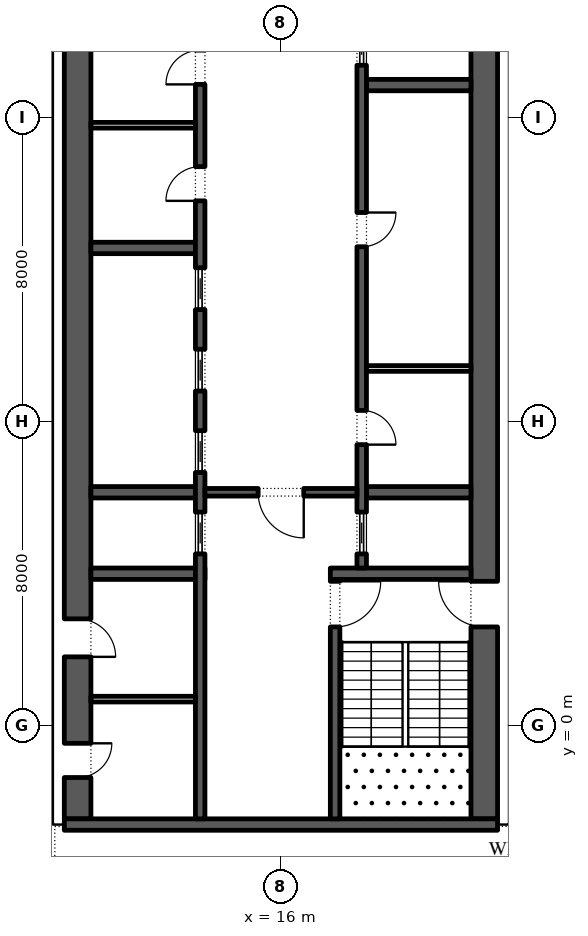
"""IFC4 building model, lengths in metres.
Left out: names, types, materials, properties, quantities, classifications, styles, units other than length and angle.
Written with IfcOpenShell. Run it as: python <this file> out.ifc"""

import sys

from ifc_helpers import new_model, si_unit, direction, frame, frame_2d, origin, place, context, subcontext, project, spatial, rectangle, extrude, element, fill, save


model = new_model("IFC4")
c1 = context("Model", 3, precision=1e-05, world=origin(), true_north=direction((0.0, 1.0)))
c2 = subcontext(c1, "Body", "Model", "MODEL_VIEW")
j1 = project(units=[si_unit("LENGTHUNIT", "METRE"), si_unit("PLANEANGLEUNIT", "RADIAN")], contexts=[c1])
p1 = place(None, origin())
s1 = spatial("IfcSite", under=j1, at=p1, CompositionType="ELEMENT")
p2 = place(p1, origin())
s2 = spatial("IfcBuilding", under=s1, at=p2, CompositionType="ELEMENT")
p3 = place(p2, frame((0.0, 0.0, 180.0)))
s3 = spatial("IfcBuildingStorey", under=s2, at=p3, CompositionType="ELEMENT", Elevation=180.0)
p4 = place(p3, frame((33.157, -5.092, 0.0), z_axis=(0.0, 0.0, 1.0), x_axis=(-0.224950279389, 0.974370243697, 0.0)))
e1 = element("IfcWall", 1, at=p4, inside=s3, PredefinedType="STANDARD", context=c2, shape_type="SweptSolid", body=[
    extrude(rectangle(XDim=49.5, YDim=0.3, at=frame_2d((24.75, 0.0))), origin(), (0.0, 0.0, 1.0), 4.0),
])
p5 = place(p4, frame((2.207, 0.0, 0.0)))
e2 = element("IfcOpeningElement", 2, at=p5, cuts=e1, PredefinedType="OPENING", context=c2, shape_type="SweptSolid", body=[
    extrude(rectangle(XDim=2.4, YDim=3.125, at=frame_2d((1.2, 1.562))), frame((0.0, 0.16, 0.0), z_axis=(0.0, -1.0, 0.0), x_axis=(1.0, 0.0, 0.0)), (0.0, 0.0, 1.0), 0.32),
])
p6 = place(p4, frame((8.121, 0.0, 0.45)))
e3 = element("IfcOpeningElement", 3, at=p6, cuts=e1, PredefinedType="OPENING", context=c2, shape_type="SweptSolid", body=[
    extrude(rectangle(XDim=4.5, YDim=2.875, at=frame_2d((2.25, 1.438))), frame((0.0, 0.16, 0.0), z_axis=(0.0, -1.0, 0.0), x_axis=(1.0, 0.0, 0.0)), (0.0, 0.0, 1.0), 0.32),
])
p7 = place(p4, frame((15.236, 0.0, 0.45)))
e4 = element("IfcOpeningElement", 4, at=p7, cuts=e1, PredefinedType="OPENING", context=c2, shape_type="SweptSolid", body=[
    extrude(rectangle(XDim=4.5, YDim=2.875, at=frame_2d((2.25, 1.438))), frame((0.0, 0.16, 0.0), z_axis=(0.0, -1.0, 0.0), x_axis=(1.0, 0.0, 0.0)), (0.0, 0.0, 1.0), 0.32),
])
p8 = place(p4, frame((22.35, 0.0, 0.45)))
e5 = element("IfcOpeningElement", 5, at=p8, cuts=e1, PredefinedType="OPENING", context=c2, shape_type="SweptSolid", body=[
    extrude(rectangle(XDim=4.5, YDim=3.0, at=frame_2d((2.25, 1.5))), frame((0.0, 0.16, 0.0), z_axis=(0.0, -1.0, 0.0), x_axis=(1.0, 0.0, 0.0)), (0.0, 0.0, 1.0), 0.32),
])
p9 = place(p4, frame((30.514, 0.0, 0.0)))
e6 = element("IfcOpeningElement", 6, at=p9, cuts=e1, PredefinedType="OPENING", context=c2, shape_type="SweptSolid", body=[
    extrude(rectangle(XDim=2.4, YDim=3.45, at=frame_2d((1.2, 1.725))), frame((0.0, 0.16, 0.0), z_axis=(0.0, -1.0, 0.0), x_axis=(1.0, 0.0, 0.0)), (0.0, 0.0, 1.0), 0.32),
])
p10 = place(p4, frame((36.579, 0.0, 0.45)))
e7 = element("IfcOpeningElement", 7, at=p10, cuts=e1, PredefinedType="OPENING", context=c2, shape_type="SweptSolid", body=[
    extrude(rectangle(XDim=4.5, YDim=3.05, at=frame_2d((2.25, 1.525))), frame((0.0, 0.16, 0.0), z_axis=(0.0, -1.0, 0.0), x_axis=(1.0, 0.0, 0.0)), (0.0, 0.0, 1.0), 0.32),
])
p11 = place(p4, frame((43.693, 0.0, 0.45)))
e8 = element("IfcOpeningElement", 8, at=p11, cuts=e1, PredefinedType="OPENING", context=c2, shape_type="SweptSolid", body=[
    extrude(rectangle(XDim=4.5, YDim=3.05, at=frame_2d((2.25, 1.525))), frame((0.0, 0.16, 0.0), z_axis=(0.0, -1.0, 0.0), x_axis=(1.0, 0.0, 0.0)), (0.0, 0.0, 1.0), 0.32),
])
p12 = place(p3, frame((21.35, -2.45, 0.0), z_axis=(0.0, 0.0, 1.0), x_axis=(0.0, 1.0, 0.0)))
e9 = element("IfcWall", 9, at=p12, inside=s3, PredefinedType="SHEAR", context=c2, shape_type="SweptSolid", body=[
    extrude(rectangle(XDim=27.9, YDim=0.7, at=frame_2d((13.95, 0.0))), origin(), (0.0, 0.0, 1.0), 4.0),
])
p13 = place(p12, frame((5.05, 0.0, 0.0)))
e10 = element("IfcOpeningElement", 10, at=p13, cuts=e9, PredefinedType="OPENING", context=c2, shape_type="SweptSolid", body=[
    extrude(rectangle(XDim=1.2, YDim=2.1, at=frame_2d((0.6, 1.05))), frame((0.0, 0.36, 0.0), z_axis=(0.0, -1.0, 0.0), x_axis=(1.0, 0.0, 0.0)), (0.0, 0.0, 1.0), 0.72),
])
p14 = place(p12, frame((21.65, 0.0, 0.0)))
e11 = element("IfcOpeningElement", 11, at=p14, cuts=e9, PredefinedType="OPENING", context=c2, shape_type="SweptSolid", body=[
    extrude(rectangle(XDim=1.2, YDim=2.1, at=frame_2d((0.6, 1.05))), frame((0.0, 0.36, 0.0), z_axis=(0.0, -1.0, 0.0), x_axis=(1.0, 0.0, 0.0)), (0.0, 0.0, 1.0), 0.72),
])
p15 = place(p3, frame((10.65, -2.45, 0.0), z_axis=(0.0, 0.0, 1.0), x_axis=(0.0, 1.0, 0.0)))
e12 = element("IfcWall", 12, at=p15, inside=s3, PredefinedType="SHEAR", context=c2, shape_type="SweptSolid", body=[
    extrude(rectangle(XDim=27.9, YDim=0.7, at=frame_2d((13.95, 0.0))), origin(), (0.0, 0.0, 1.0), 4.0),
])
p16 = place(p15, frame((23.65, 0.0, 0.0)))
e13 = element("IfcOpeningElement", 13, at=p16, cuts=e12, PredefinedType="OPENING", context=c2, shape_type="SweptSolid", body=[
    extrude(rectangle(XDim=2.4, YDim=2.1, at=frame_2d((1.2, 1.05))), frame((0.0, 0.36, 0.0), z_axis=(0.0, -1.0, 0.0), x_axis=(1.0, 0.0, 0.0)), (0.0, 0.0, 1.0), 0.72),
])
p17 = place(p15, frame((1.087, 0.0, 0.0)))
e14 = element("IfcOpeningElement", 14, at=p17, cuts=e12, PredefinedType="OPENING", context=c2, shape_type="SweptSolid", body=[
    extrude(rectangle(XDim=0.9, YDim=2.1, at=frame_2d((0.45, 1.05))), frame((0.0, 0.36, 0.0), z_axis=(0.0, -1.0, 0.0), x_axis=(1.0, 0.0, 0.0)), (0.0, 0.0, 1.0), 0.72),
])
p18 = place(p15, frame((4.262, 0.0, 0.0)))
e15 = element("IfcOpeningElement", 15, at=p18, cuts=e12, PredefinedType="OPENING", context=c2, shape_type="SweptSolid", body=[
    extrude(rectangle(XDim=1.0, YDim=2.1, at=frame_2d((0.5, 1.05))), frame((0.0, 0.36, 0.0), z_axis=(0.0, -1.0, 0.0), x_axis=(1.0, 0.0, 0.0)), (0.0, 0.0, 1.0), 0.72),
])
p19 = place(p3, frame((10.3, -2.6, 0.0), z_axis=(0.0, 0.0, 1.0), x_axis=(1.0, 0.0, 0.0)))
e16 = element("IfcWall", 16, at=p19, inside=s3, PredefinedType="SHEAR", context=c2, shape_type="SweptSolid", body=[
    extrude(rectangle(XDim=11.4, YDim=0.3, at=frame_2d((5.7, 0.0))), origin(), (0.0, 0.0, 1.0), 4.0),
])
p20 = place(p3, frame((17.3, 4.0, 0.0), z_axis=(0.0, 0.0, 1.0), x_axis=(1.0, 0.0, 0.0)))
e17 = element("IfcWall", 17, at=p20, inside=s3, PredefinedType="SHEAR", context=c2, shape_type="SweptSolid", body=[
    extrude(rectangle(XDim=3.7, YDim=0.3, at=frame_2d((1.85, 0.0))), origin(), (0.0, 0.0, 1.0), 4.0),
])
p21 = place(p3, frame((17.425, -2.45, 0.0), z_axis=(0.0, 0.0, 1.0), x_axis=(0.0, 1.0, 0.0)))
e18 = element("IfcWall", 18, at=p21, inside=s3, PredefinedType="SHEAR", context=c2, shape_type="SweptSolid", body=[
    extrude(rectangle(XDim=6.3, YDim=0.25, at=frame_2d((3.15, 0.0))), origin(), (0.0, 0.0, 1.0), 4.0),
])
p22 = place(p21, frame((5.05, 0.0, 0.0)))
e19 = element("IfcOpeningElement", 19, at=p22, cuts=e18, PredefinedType="OPENING", context=c2, shape_type="SweptSolid", body=[
    extrude(rectangle(XDim=1.2, YDim=2.1, at=frame_2d((0.6, 1.05))), frame((0.0, 0.135, 0.0), z_axis=(0.0, -1.0, 0.0), x_axis=(1.0, 0.0, 0.0)), (0.0, 0.0, 1.0), 0.27),
])
for number, where, z_axis, x_axis in (
    (20, (18.25, 6.143, 0.0), (0.0, 0.0, 1.0), (1.0, 0.0, 0.0)),
    (21, (18.25, 16.857, 0.0), (0.0, 0.0, 1.0), (1.0, 0.0, 0.0)),
):
    element("IfcWall", number, at=place(p3, frame(where, z_axis=z_axis, x_axis=x_axis)), inside=s3, PredefinedType="SHEAR", context=c2, shape_type="SweptSolid", body=[
        extrude(rectangle(XDim=2.75, YDim=0.3, at=frame_2d((1.375, 0.0))), origin(), (0.0, 0.0, 1.0), 4.0),
    ])
p23 = place(p3, frame((18.125, 4.15, 0.0), z_axis=(0.0, 0.0, 1.0), x_axis=(0.0, 1.0, 0.0)))
e22 = element("IfcWall", 22, at=p23, inside=s3, PredefinedType="SHEAR", context=c2, shape_type="SweptSolid", body=[
    extrude(rectangle(XDim=14.7, YDim=0.25, at=frame_2d((7.35, 0.0))), origin(), (0.0, 0.0, 1.0), 4.0),
])
p24 = place(p23, frame((3.246, 0.0, 0.0)))
e23 = element("IfcOpeningElement", 23, at=p24, cuts=e22, PredefinedType="OPENING", context=c2, shape_type="SweptSolid", body=[
    extrude(rectangle(XDim=0.9, YDim=2.1, at=frame_2d((0.45, 1.05))), frame((0.0, 0.135, 0.0), z_axis=(0.0, -1.0, 0.0), x_axis=(1.0, 0.0, 0.0)), (0.0, 0.0, 1.0), 0.27),
])
p25 = place(p23, frame((8.454, 0.0, 0.0)))
e24 = element("IfcOpeningElement", 24, at=p25, cuts=e22, PredefinedType="OPENING", context=c2, shape_type="SweptSolid", body=[
    extrude(rectangle(XDim=0.9, YDim=2.1, at=frame_2d((0.45, 1.05))), frame((0.0, 0.135, 0.0), z_axis=(0.0, -1.0, 0.0), x_axis=(1.0, 0.0, 0.0)), (0.0, 0.0, 1.0), 0.27),
])
p26 = place(p23, frame((0.371, 0.0, 0.0)))
e25 = element("IfcOpeningElement", 25, at=p26, cuts=e22, PredefinedType="OPENING", context=c2, shape_type="SweptSolid", body=[
    extrude(rectangle(XDim=1.1, YDim=2.1, at=frame_2d((0.55, 1.05))), frame((0.0, 0.135, 0.0), z_axis=(0.0, -1.0, 0.0), x_axis=(1.0, 0.0, 0.0)), (0.0, 0.0, 1.0), 0.27),
])
p27 = place(p23, frame((13.229, 0.0, 0.0)))
e26 = element("IfcOpeningElement", 26, at=p27, cuts=e22, PredefinedType="OPENING", context=c2, shape_type="SweptSolid", body=[
    extrude(rectangle(XDim=1.1, YDim=2.1, at=frame_2d((0.55, 1.05))), frame((0.0, 0.135, 0.0), z_axis=(0.0, -1.0, 0.0), x_axis=(1.0, 0.0, 0.0)), (0.0, 0.0, 1.0), 0.27),
])
p28 = place(p3, frame((18.25, 9.4, 0.0), z_axis=(0.0, 0.0, 1.0), x_axis=(1.0, 0.0, 0.0)))
e27 = element("IfcWall", 27, at=p28, inside=s3, PredefinedType="PARTITIONING", context=c2, shape_type="SweptSolid", body=[
    extrude(rectangle(XDim=2.75, YDim=0.15, at=frame_2d((1.375, 0.0))), origin(), (0.0, 0.0, 1.0), 4.0),
])
p29 = place(p3, frame((11.0, 4.0, 0.0), z_axis=(0.0, 0.0, 1.0), x_axis=(1.0, 0.0, 0.0)))
e28 = element("IfcWall", 28, at=p29, inside=s3, PredefinedType="SHEAR", context=c2, shape_type="SweptSolid", body=[
    extrude(rectangle(XDim=3.0, YDim=0.3, at=frame_2d((1.5, 0.0))), origin(), (0.0, 0.0, 1.0), 4.0),
])
for number, where, z_axis, x_axis in (
    (29, (11.0, 6.143, 0.0), (0.0, 0.0, 1.0), (1.0, 0.0, 0.0)),
    (30, (11.0, 12.571, 0.0), (0.0, 0.0, 1.0), (1.0, 0.0, 0.0)),
):
    element("IfcWall", number, at=place(p3, frame(where, z_axis=z_axis, x_axis=x_axis)), inside=s3, PredefinedType="SHEAR", context=c2, shape_type="SweptSolid", body=[
        extrude(rectangle(XDim=2.75, YDim=0.3, at=frame_2d((1.375, 0.0))), origin(), (0.0, 0.0, 1.0), 4.0),
    ])
p30 = place(p3, frame((13.875, -2.45, 0.0), z_axis=(0.0, 0.0, 1.0), x_axis=(0.0, 1.0, 0.0)))
e31 = element("IfcWall", 31, at=p30, inside=s3, PredefinedType="SHEAR", context=c2, shape_type="SweptSolid", body=[
    extrude(rectangle(XDim=21.3, YDim=0.25, at=frame_2d((10.65, 0.0))), origin(), (0.0, 0.0, 1.0), 4.0),
])
p31 = place(p30, frame((16.261, 0.0, 0.0)))
e32 = element("IfcOpeningElement", 32, at=p31, cuts=e31, PredefinedType="OPENING", context=c2, shape_type="SweptSolid", body=[
    extrude(rectangle(XDim=0.9, YDim=2.1, at=frame_2d((0.45, 1.05))), frame((0.0, 0.135, 0.0), z_axis=(0.0, -1.0, 0.0), x_axis=(1.0, 0.0, 0.0)), (0.0, 0.0, 1.0), 0.27),
])
p32 = place(p30, frame((19.325, 0.0, 0.0)))
e33 = element("IfcOpeningElement", 33, at=p32, cuts=e31, PredefinedType="OPENING", context=c2, shape_type="SweptSolid", body=[
    extrude(rectangle(XDim=0.9, YDim=2.1, at=frame_2d((0.45, 1.05))), frame((0.0, 0.135, 0.0), z_axis=(0.0, -1.0, 0.0), x_axis=(1.0, 0.0, 0.0)), (0.0, 0.0, 1.0), 0.27),
])
p33 = place(p30, frame((6.971, 0.0, 0.0)))
e34 = element("IfcOpeningElement", 34, at=p33, cuts=e31, PredefinedType="OPENING", context=c2, shape_type="SweptSolid", body=[
    extrude(rectangle(XDim=1.1, YDim=2.1, at=frame_2d((0.55, 1.05))), frame((0.0, 0.135, 0.0), z_axis=(0.0, -1.0, 0.0), x_axis=(1.0, 0.0, 0.0)), (0.0, 0.0, 1.0), 0.27),
])
p34 = place(p30, frame((9.114, 0.0, 0.0)))
e35 = element("IfcOpeningElement", 35, at=p34, cuts=e31, PredefinedType="OPENING", context=c2, shape_type="SweptSolid", body=[
    extrude(rectangle(XDim=1.1, YDim=2.1, at=frame_2d((0.55, 1.05))), frame((0.0, 0.135, 0.0), z_axis=(0.0, -1.0, 0.0), x_axis=(1.0, 0.0, 0.0)), (0.0, 0.0, 1.0), 0.27),
])
p35 = place(p30, frame((11.257, 0.0, 0.0)))
e36 = element("IfcOpeningElement", 36, at=p35, cuts=e31, PredefinedType="OPENING", context=c2, shape_type="SweptSolid", body=[
    extrude(rectangle(XDim=1.1, YDim=2.1, at=frame_2d((0.55, 1.05))), frame((0.0, 0.135, 0.0), z_axis=(0.0, -1.0, 0.0), x_axis=(1.0, 0.0, 0.0)), (0.0, 0.0, 1.0), 0.27),
])
p36 = place(p30, frame((13.4, 0.0, 0.0)))
e37 = element("IfcOpeningElement", 37, at=p36, cuts=e31, PredefinedType="OPENING", context=c2, shape_type="SweptSolid", body=[
    extrude(rectangle(XDim=1.1, YDim=2.1, at=frame_2d((0.55, 1.05))), frame((0.0, 0.135, 0.0), z_axis=(0.0, -1.0, 0.0), x_axis=(1.0, 0.0, 0.0)), (0.0, 0.0, 1.0), 0.27),
])
p37 = place(p3, frame((11.0, 15.8, 0.0), z_axis=(0.0, 0.0, 1.0), x_axis=(1.0, 0.0, 0.0)))
e38 = element("IfcWall", 38, at=p37, inside=s3, PredefinedType="PARTITIONING", context=c2, shape_type="SweptSolid", body=[
    extrude(rectangle(XDim=2.75, YDim=0.15, at=frame_2d((1.375, 0.0))), origin(), (0.0, 0.0, 1.0), 4.0),
])
p38 = place(p3, frame((14.0, 6.143, 0.0), z_axis=(0.0, 0.0, 1.0), x_axis=(1.0, 0.0, 0.0)))
e39 = element("IfcWall", 39, at=p38, inside=s3, PredefinedType="SHEAR", context=c2, shape_type="SweptSolid", body=[
    extrude(rectangle(XDim=4.0, YDim=0.2, at=frame_2d((2.0, 0.0))), origin(), (0.0, 0.0, 1.0), 4.0),
])
p39 = place(p38, frame((1.4, 0.0, 0.0)))
e40 = element("IfcOpeningElement", 40, at=p39, cuts=e39, PredefinedType="OPENING", context=c2, shape_type="SweptSolid", body=[
    extrude(rectangle(XDim=1.2, YDim=2.1, at=frame_2d((0.6, 1.05))), frame((0.0, 0.11, 0.0), z_axis=(0.0, -1.0, 0.0), x_axis=(1.0, 0.0, 0.0)), (0.0, 0.0, 1.0), 0.22),
])
p40 = place(p3, frame((11.0, 0.7, 0.0), z_axis=(0.0, 0.0, 1.0), x_axis=(1.0, 0.0, 0.0)))
e41 = element("IfcWall", 41, at=p40, inside=s3, PredefinedType="PARTITIONING", context=c2, shape_type="SweptSolid", body=[
    extrude(rectangle(XDim=2.75, YDim=0.15, at=frame_2d((1.375, 0.0))), origin(), (0.0, 0.0, 1.0), 4.0),
])
p41 = place(p24, frame((0.9, -0.2, 0.0), z_axis=(0.0, 0.0, 1.0), x_axis=(-1.0, 0.0, 0.0)))
e42 = element("IfcDoor", 42, at=p41, inside=s3, OperationType="SINGLE_SWING_LEFT", PredefinedType="DOOR", context=c2, shape_type="SweptSolid", body=[
    extrude(rectangle(XDim=0.9, YDim=2.1, at=frame_2d((0.45, 1.05))), frame((0.0, -0.075, 0.0), z_axis=(0.0, -1.0, 0.0), x_axis=(1.0, 0.0, 0.0)), (0.0, 0.0, 1.0), 0.05),
])
fill(e23, e42)
p42 = place(p25, frame((0.9, -0.2, 0.0), z_axis=(0.0, 0.0, 1.0), x_axis=(-1.0, 0.0, 0.0)))
e43 = element("IfcDoor", 43, at=p42, inside=s3, OperationType="SINGLE_SWING_RIGHT", PredefinedType="DOOR", context=c2, shape_type="SweptSolid", body=[
    extrude(rectangle(XDim=0.9, YDim=2.1, at=frame_2d((0.45, 1.05))), frame((0.0, -0.075, 0.0), z_axis=(0.0, -1.0, 0.0), x_axis=(1.0, 0.0, 0.0)), (0.0, 0.0, 1.0), 0.05),
])
fill(e24, e43)
p43 = place(p26, origin())
e44 = element("IfcDoor", 44, at=p43, inside=s3, OperationType="SLIDING_TO_LEFT", PredefinedType="DOOR", context=c2, shape_type="SweptSolid", body=[
    extrude(rectangle(XDim=1.1, YDim=2.1, at=frame_2d((0.55, 1.05))), frame((0.0, 0.025, 0.0), z_axis=(0.0, -1.0, 0.0), x_axis=(1.0, 0.0, 0.0)), (0.0, 0.0, 1.0), 0.05),
])
fill(e25, e44)
p44 = place(p27, origin())
e45 = element("IfcDoor", 45, at=p44, inside=s3, OperationType="SLIDING_TO_LEFT", PredefinedType="DOOR", context=c2, shape_type="SweptSolid", body=[
    extrude(rectangle(XDim=1.1, YDim=2.1, at=frame_2d((0.55, 1.05))), frame((0.0, 0.025, 0.0), z_axis=(0.0, -1.0, 0.0), x_axis=(1.0, 0.0, 0.0)), (0.0, 0.0, 1.0), 0.05),
])
fill(e26, e45)
p45 = place(p31, origin())
e46 = element("IfcDoor", 46, at=p45, inside=s3, OperationType="SINGLE_SWING_RIGHT", PredefinedType="DOOR", context=c2, shape_type="SweptSolid", body=[
    extrude(rectangle(XDim=0.9, YDim=2.1, at=frame_2d((0.45, 1.05))), frame((0.0, 0.125, 0.0), z_axis=(0.0, -1.0, 0.0), x_axis=(1.0, 0.0, 0.0)), (0.0, 0.0, 1.0), 0.05),
])
fill(e32, e46)
p46 = place(p32, origin())
e47 = element("IfcDoor", 47, at=p46, inside=s3, OperationType="SINGLE_SWING_RIGHT", PredefinedType="DOOR", context=c2, shape_type="SweptSolid", body=[
    extrude(rectangle(XDim=0.9, YDim=2.1, at=frame_2d((0.45, 1.05))), frame((0.0, 0.125, 0.0), z_axis=(0.0, -1.0, 0.0), x_axis=(1.0, 0.0, 0.0)), (0.0, 0.0, 1.0), 0.05),
])
fill(e33, e47)
p47 = place(p33, origin())
e48 = element("IfcDoor", 48, at=p47, inside=s3, OperationType="SLIDING_TO_LEFT", PredefinedType="DOOR", context=c2, shape_type="SweptSolid", body=[
    extrude(rectangle(XDim=1.1, YDim=2.1, at=frame_2d((0.55, 1.05))), frame((0.0, 0.025, 0.0), z_axis=(0.0, -1.0, 0.0), x_axis=(1.0, 0.0, 0.0)), (0.0, 0.0, 1.0), 0.05),
])
fill(e34, e48)
p48 = place(p34, origin())
e49 = element("IfcDoor", 49, at=p48, inside=s3, OperationType="SLIDING_TO_LEFT", PredefinedType="DOOR", context=c2, shape_type="SweptSolid", body=[
    extrude(rectangle(XDim=1.1, YDim=2.1, at=frame_2d((0.55, 1.05))), frame((0.0, 0.025, 0.0), z_axis=(0.0, -1.0, 0.0), x_axis=(1.0, 0.0, 0.0)), (0.0, 0.0, 1.0), 0.05),
])
fill(e35, e49)
p49 = place(p35, origin())
e50 = element("IfcDoor", 50, at=p49, inside=s3, OperationType="SLIDING_TO_LEFT", PredefinedType="DOOR", context=c2, shape_type="SweptSolid", body=[
    extrude(rectangle(XDim=1.1, YDim=2.1, at=frame_2d((0.55, 1.05))), frame((0.0, 0.025, 0.0), z_axis=(0.0, -1.0, 0.0), x_axis=(1.0, 0.0, 0.0)), (0.0, 0.0, 1.0), 0.05),
])
fill(e36, e50)
p50 = place(p36, origin())
e51 = element("IfcDoor", 51, at=p50, inside=s3, OperationType="SLIDING_TO_LEFT", PredefinedType="DOOR", context=c2, shape_type="SweptSolid", body=[
    extrude(rectangle(XDim=1.1, YDim=2.1, at=frame_2d((0.55, 1.05))), frame((0.0, 0.025, 0.0), z_axis=(0.0, -1.0, 0.0), x_axis=(1.0, 0.0, 0.0)), (0.0, 0.0, 1.0), 0.05),
])
fill(e37, e51)
p51 = place(p39, frame((1.2, 0.0, 0.0), z_axis=(0.0, 0.0, 1.0), x_axis=(-1.0, 0.0, 0.0)))
e52 = element("IfcDoor", 52, at=p51, inside=s3, OperationType="SINGLE_SWING_RIGHT", PredefinedType="DOOR", context=c2, shape_type="SweptSolid", body=[
    extrude(rectangle(XDim=1.2, YDim=2.1, at=frame_2d((0.6, 1.05))), frame((0.0, 0.025, 0.0), z_axis=(0.0, -1.0, 0.0), x_axis=(1.0, 0.0, 0.0)), (0.0, 0.0, 1.0), 0.05),
])
fill(e40, e52)
p52 = place(p22, frame((1.2, 0.0, 0.0), z_axis=(0.0, 0.0, 1.0), x_axis=(-1.0, 0.0, 0.0)))
e53 = element("IfcDoor", 53, at=p52, inside=s3, OperationType="SINGLE_SWING_RIGHT", PredefinedType="DOOR", context=c2, shape_type="SweptSolid", body=[
    extrude(rectangle(XDim=1.2, YDim=2.1, at=frame_2d((0.6, 1.05))), frame((0.0, 0.025, 0.0), z_axis=(0.0, -1.0, 0.0), x_axis=(1.0, 0.0, 0.0)), (0.0, 0.0, 1.0), 0.05),
])
fill(e19, e53)
p53 = place(p13, origin())
e54 = element("IfcDoor", 54, at=p53, inside=s3, OperationType="SINGLE_SWING_LEFT", PredefinedType="DOOR", context=c2, shape_type="SweptSolid", body=[
    extrude(rectangle(XDim=1.2, YDim=2.1, at=frame_2d((0.6, 1.05))), frame((0.0, 0.025, 0.0), z_axis=(0.0, -1.0, 0.0), x_axis=(1.0, 0.0, 0.0)), (0.0, 0.0, 1.0), 0.05),
])
fill(e10, e54)
p54 = place(p17, frame((0.9, -0.65, 0.0), z_axis=(0.0, 0.0, 1.0), x_axis=(-1.0, 0.0, 0.0)))
e55 = element("IfcDoor", 55, at=p54, inside=s3, OperationType="SINGLE_SWING_RIGHT", PredefinedType="DOOR", context=c2, shape_type="SweptSolid", body=[
    extrude(rectangle(XDim=0.9, YDim=2.1, at=frame_2d((0.45, 1.05))), frame((0.0, -0.3, 0.0), z_axis=(0.0, -1.0, 0.0), x_axis=(1.0, 0.0, 0.0)), (0.0, 0.0, 1.0), 0.05),
])
fill(e14, e55)
p55 = place(p18, frame((1.0, -0.65, 0.0), z_axis=(0.0, 0.0, 1.0), x_axis=(-1.0, 0.0, 0.0)))
e56 = element("IfcDoor", 56, at=p55, inside=s3, OperationType="SINGLE_SWING_LEFT", PredefinedType="DOOR", context=c2, shape_type="SweptSolid", body=[
    extrude(rectangle(XDim=1.0, YDim=2.1, at=frame_2d((0.5, 1.05))), frame((0.0, -0.3, 0.0), z_axis=(0.0, -1.0, 0.0), x_axis=(1.0, 0.0, 0.0)), (0.0, 0.0, 1.0), 0.05),
])
fill(e15, e56)
save(model, sys.argv[1])
